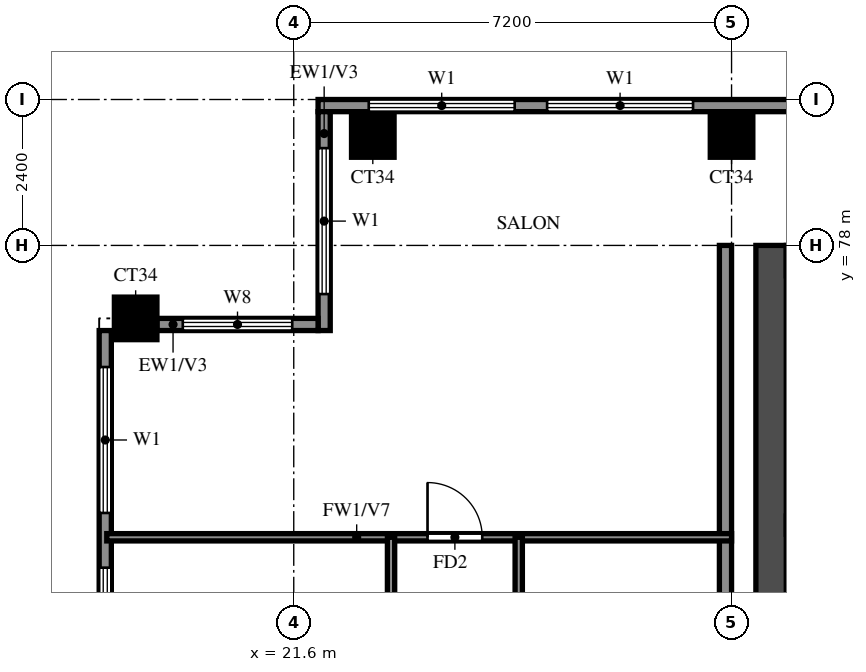
"""IFC4 building model, lengths in metres.
Left out: names, types, materials, properties, quantities, classifications, styles, units other than length and angle.
Written with IfcOpenShell. Run it as: python <this file> out.ifc"""

import sys

from ifc_helpers import new_model, si_unit, direction, frame, frame_2d, origin, origin_2d, place, context, subcontext, project, spatial, rectangle, extrude, source, transform, mapped, element, fill, save


model = new_model("IFC4")
c1 = context("Model", 3, precision=1e-05, world=origin(), true_north=direction((0.0, 1.0)))
c2 = subcontext(c1, "Body", "Model", "MODEL_VIEW")
j1 = project(units=[si_unit("LENGTHUNIT", "METRE"), si_unit("PLANEANGLEUNIT", "RADIAN")], contexts=[c1])
p1 = place(None, origin())
s1 = spatial("IfcSite", under=j1, at=p1, CompositionType="ELEMENT")
p2 = place(p1, origin())
s2 = spatial("IfcBuilding", under=s1, at=p2, CompositionType="ELEMENT")
p3 = place(p2, frame((0.0, 0.0, 225.5)))
s3 = spatial("IfcBuildingStorey", under=s2, at=p3, CompositionType="ELEMENT", Elevation=225.5)
m1 = source(origin(), c2, "Body", "SweptSolid", [
    extrude(rectangle(XDim=0.7, YDim=0.7, at=origin_2d()), origin(), (0.0, 0.0, 1.0), 3.22),
])
for number, where, z_axis, x_axis in (
    (1, (19.0, 76.8, 0.0), (0.0, 0.0, 1.0), (1.0, 0.0, 0.0)),
    (2, (22.9, 79.8, 0.0), (0.0, 0.0, 1.0), (1.0, 0.0, 0.0)),
    (3, (28.8, 79.8, 0.0), (0.0, 0.0, 1.0), (1.0, 0.0, 0.0)),
):
    element("IfcColumn", number, at=place(p3, frame(where, z_axis=z_axis, x_axis=x_axis)), inside=s3, PredefinedType="COLUMN", context=c2, shape_type="MappedRepresentation", body=[
        mapped(m1, transform((0.0, 0.0, 0.0))),
    ])
p4 = place(p3, frame((29.45, 66.15, 0.0), z_axis=(0.0, 0.0, 1.0), x_axis=(0.0, 1.0, 0.0)))
e4 = element("IfcWall", 4, at=p4, inside=s3, PredefinedType="SHEAR", context=c2, shape_type="SweptSolid", body=[
    extrude(rectangle(XDim=11.85, YDim=0.5, at=frame_2d((5.925, 0.0))), origin(), (0.0, 0.0, 1.0), 3.22),
])
p5 = place(p3, frame((78.6, 80.3, 0.0), z_axis=(0.0, 0.0, 1.0), x_axis=(-1.0, 0.0, 0.0)))
e5 = element("IfcWall", 5, at=p5, inside=s3, PredefinedType="SOLIDWALL", context=c2, shape_type="SweptSolid", body=[
    extrude(rectangle(XDim=56.6, YDim=0.2, at=frame_2d((28.3, 0.0))), origin(), (0.0, 0.0, 1.0), 3.22),
])
p6 = place(p5, frame((50.433, 0.0, 0.6)))
e6 = element("IfcOpeningElement", 6, at=p6, cuts=e5, PredefinedType="OPENING", context=c2, shape_type="SweptSolid", body=[
    extrude(rectangle(XDim=2.4, YDim=2.4, at=frame_2d((1.2, 1.2))), frame((0.0, 0.11, 0.0), z_axis=(0.0, -1.0, 0.0), x_axis=(1.0, 0.0, 0.0)), (0.0, 0.0, 1.0), 0.22),
])
p7 = place(p5, frame((53.367, 0.0, 0.6)))
e7 = element("IfcOpeningElement", 7, at=p7, cuts=e5, PredefinedType="OPENING", context=c2, shape_type="SweptSolid", body=[
    extrude(rectangle(XDim=2.4, YDim=2.4, at=frame_2d((1.2, 1.2))), frame((0.0, 0.11, 0.0), z_axis=(0.0, -1.0, 0.0), x_axis=(1.0, 0.0, 0.0)), (0.0, 0.0, 1.0), 0.22),
])
p8 = place(p5, frame((0.767, 0.0, 0.6)))
e8 = element("IfcOpeningElement", 8, at=p8, cuts=e5, PredefinedType="OPENING", context=c2, shape_type="SweptSolid", body=[
    extrude(rectangle(XDim=2.4, YDim=2.4, at=frame_2d((1.2, 1.2))), frame((0.0, 0.11, 0.0), z_axis=(0.0, -1.0, 0.0), x_axis=(1.0, 0.0, 0.0)), (0.0, 0.0, 1.0), 0.22),
])
p9 = place(p5, frame((3.633, 0.0, 0.6)))
e9 = element("IfcOpeningElement", 9, at=p9, cuts=e5, PredefinedType="OPENING", context=c2, shape_type="SweptSolid", body=[
    extrude(rectangle(XDim=2.4, YDim=2.4, at=frame_2d((1.2, 1.2))), frame((0.0, 0.11, 0.0), z_axis=(0.0, -1.0, 0.0), x_axis=(1.0, 0.0, 0.0)), (0.0, 0.0, 1.0), 0.22),
])
p10 = place(p3, frame((22.1, 80.2, 0.0), z_axis=(0.0, 0.0, 1.0), x_axis=(0.0, -1.0, 0.0)))
e10 = element("IfcWall", 10, at=p10, inside=s3, PredefinedType="SOLIDWALL", context=c2, shape_type="SweptSolid", body=[
    extrude(rectangle(XDim=3.6, YDim=0.2, at=frame_2d((1.8, 0.0))), origin(), (0.0, 0.0, 1.0), 3.22),
])
p11 = place(p10, frame((0.6, 0.0, 0.6)))
e11 = element("IfcOpeningElement", 11, at=p11, cuts=e10, PredefinedType="OPENING", context=c2, shape_type="SweptSolid", body=[
    extrude(rectangle(XDim=2.4, YDim=2.4, at=frame_2d((1.2, 1.2))), frame((0.0, 0.11, 0.0), z_axis=(0.0, -1.0, 0.0), x_axis=(1.0, 0.0, 0.0)), (0.0, 0.0, 1.0), 0.22),
])
p12 = place(p3, frame((22.0, 76.7, 0.0), z_axis=(0.0, 0.0, 1.0), x_axis=(-1.0, 0.0, 0.0)))
e12 = element("IfcWall", 12, at=p12, inside=s3, PredefinedType="SOLIDWALL", context=c2, shape_type="SweptSolid", body=[
    extrude(rectangle(XDim=2.65, YDim=0.2, at=frame_2d((1.325, 0.0))), origin(), (0.0, 0.0, 1.0), 3.22),
])
p13 = place(p12, frame((0.425, 0.0, 0.6)))
e13 = element("IfcOpeningElement", 13, at=p13, cuts=e12, PredefinedType="OPENING", context=c2, shape_type="SweptSolid", body=[
    extrude(rectangle(XDim=1.8, YDim=2.4, at=frame_2d((0.9, 1.2))), frame((0.0, 0.11, 0.0), z_axis=(0.0, -1.0, 0.0), x_axis=(1.0, 0.0, 0.0)), (0.0, 0.0, 1.0), 0.22),
])
p14 = place(p3, frame((18.5, 76.6, 0.0), z_axis=(0.0, 0.0, 1.0), x_axis=(0.0, -1.0, 0.0)))
e14 = element("IfcWall", 14, at=p14, inside=s3, PredefinedType="SOLIDWALL", context=c2, shape_type="SweptSolid", body=[
    extrude(rectangle(XDim=7.0, YDim=0.2, at=frame_2d((3.5, 0.0))), origin(), (0.0, 0.0, 1.0), 3.22),
])
p15 = place(p14, frame((3.9, 0.0, 0.6)))
e15 = element("IfcOpeningElement", 15, at=p15, cuts=e14, PredefinedType="OPENING", context=c2, shape_type="SweptSolid", body=[
    extrude(rectangle(XDim=2.4, YDim=2.4, at=frame_2d((1.2, 1.2))), frame((0.0, 0.11, 0.0), z_axis=(0.0, -1.0, 0.0), x_axis=(1.0, 0.0, 0.0)), (0.0, 0.0, 1.0), 0.22),
])
p16 = place(p14, frame((0.6, 0.0, 0.6)))
e16 = element("IfcOpeningElement", 16, at=p16, cuts=e14, PredefinedType="OPENING", context=c2, shape_type="SweptSolid", body=[
    extrude(rectangle(XDim=2.4, YDim=2.4, at=frame_2d((1.2, 1.2))), frame((0.0, 0.11, 0.0), z_axis=(0.0, -1.0, 0.0), x_axis=(1.0, 0.0, 0.0)), (0.0, 0.0, 1.0), 0.22),
])
p17 = place(p3, frame((28.7, 62.4, 0.0), z_axis=(0.0, 0.0, 1.0), x_axis=(0.0, 1.0, 0.0)))
e17 = element("IfcWall", 17, at=p17, inside=s3, PredefinedType="SOLIDWALL", context=c2, shape_type="SweptSolid", body=[
    extrude(rectangle(XDim=15.6, YDim=0.2, at=frame_2d((7.8, 0.0))), origin(), (0.0, 0.0, 1.0), 3.22),
])
p18 = place(p3, frame((18.525, 73.2, 0.0), z_axis=(0.0, 0.0, 1.0), x_axis=(1.0, 0.0, 0.0)))
e18 = element("IfcWall", 18, at=p18, inside=s3, PredefinedType="PARTITIONING", context=c2, shape_type="SweptSolid", body=[
    extrude(rectangle(XDim=10.275, YDim=0.12, at=frame_2d((5.138, 0.0))), origin(), (0.0, 0.0, 1.0), 2.32),
])
p19 = place(p18, frame((5.275, 0.0, 0.0)))
e19 = element("IfcOpeningElement", 19, at=p19, cuts=e18, PredefinedType="OPENING", context=c2, shape_type="SweptSolid", body=[
    extrude(rectangle(XDim=0.9, YDim=2.1, at=frame_2d((0.45, 1.05))), frame((0.0, 0.07, 0.0), z_axis=(0.0, -1.0, 0.0), x_axis=(1.0, 0.0, 0.0)), (0.0, 0.0, 1.0), 0.14),
])
p20 = place(p3, frame((23.2, 48.0, 0.0), z_axis=(0.0, 0.0, 1.0), x_axis=(0.0, 1.0, 0.0)))
e20 = element("IfcWall", 20, at=p20, inside=s3, PredefinedType="PARTITIONING", context=c2, shape_type="SweptSolid", body=[
    extrude(rectangle(XDim=25.2, YDim=0.12, at=frame_2d((12.6, 0.0))), origin(), (0.0, 0.0, 1.0), 3.22),
])
p21 = place(p20, frame((1.35, 0.0, 0.0)))
e21 = element("IfcOpeningElement", 21, at=p21, cuts=e20, PredefinedType="OPENING", context=c2, shape_type="SweptSolid", body=[
    extrude(rectangle(XDim=0.9, YDim=2.1, at=frame_2d((0.45, 1.05))), frame((0.0, 0.07, 0.0), z_axis=(0.0, -1.0, 0.0), x_axis=(1.0, 0.0, 0.0)), (0.0, 0.0, 1.0), 0.14),
])
p22 = place(p20, frame((4.95, 0.0, 0.0)))
e22 = element("IfcOpeningElement", 22, at=p22, cuts=e20, PredefinedType="OPENING", context=c2, shape_type="SweptSolid", body=[
    extrude(rectangle(XDim=0.9, YDim=2.1, at=frame_2d((0.45, 1.05))), frame((0.0, 0.07, 0.0), z_axis=(0.0, -1.0, 0.0), x_axis=(1.0, 0.0, 0.0)), (0.0, 0.0, 1.0), 0.14),
])
p23 = place(p20, frame((10.05, 0.0, 0.0)))
e23 = element("IfcOpeningElement", 23, at=p23, cuts=e20, PredefinedType="OPENING", context=c2, shape_type="SweptSolid", body=[
    extrude(rectangle(XDim=1.5, YDim=2.1, at=frame_2d((0.75, 1.05))), frame((0.0, 0.07, 0.0), z_axis=(0.0, -1.0, 0.0), x_axis=(1.0, 0.0, 0.0)), (0.0, 0.0, 1.0), 0.14),
])
p24 = place(p20, frame((15.75, 0.0, 0.0)))
e24 = element("IfcOpeningElement", 24, at=p24, cuts=e20, PredefinedType="OPENING", context=c2, shape_type="SweptSolid", body=[
    extrude(rectangle(XDim=0.9, YDim=2.1, at=frame_2d((0.45, 1.05))), frame((0.0, 0.07, 0.0), z_axis=(0.0, -1.0, 0.0), x_axis=(1.0, 0.0, 0.0)), (0.0, 0.0, 1.0), 0.14),
])
p25 = place(p20, frame((19.35, 0.0, 0.0)))
e25 = element("IfcOpeningElement", 25, at=p25, cuts=e20, PredefinedType="OPENING", context=c2, shape_type="SweptSolid", body=[
    extrude(rectangle(XDim=0.9, YDim=2.1, at=frame_2d((0.45, 1.05))), frame((0.0, 0.07, 0.0), z_axis=(0.0, -1.0, 0.0), x_axis=(1.0, 0.0, 0.0)), (0.0, 0.0, 1.0), 0.14),
])
p26 = place(p20, frame((22.95, 0.0, 0.0)))
e26 = element("IfcOpeningElement", 26, at=p26, cuts=e20, PredefinedType="OPENING", context=c2, shape_type="SweptSolid", body=[
    extrude(rectangle(XDim=0.9, YDim=2.1, at=frame_2d((0.45, 1.05))), frame((0.0, 0.07, 0.0), z_axis=(0.0, -1.0, 0.0), x_axis=(1.0, 0.0, 0.0)), (0.0, 0.0, 1.0), 0.14),
])
p27 = place(p3, frame((25.3, 64.8, 0.0), z_axis=(0.0, 0.0, 1.0), x_axis=(0.0, 1.0, 0.0)))
e27 = element("IfcWall", 27, at=p27, inside=s3, PredefinedType="PARTITIONING", context=c2, shape_type="SweptSolid", body=[
    extrude(rectangle(XDim=8.4, YDim=0.12, at=frame_2d((4.2, 0.0))), origin(), (0.0, 0.0, 1.0), 3.22),
])
p28 = place(p27, frame((4.975, 0.0, 0.0)))
e28 = element("IfcOpeningElement", 28, at=p28, cuts=e27, PredefinedType="OPENING", context=c2, shape_type="SweptSolid", body=[
    extrude(rectangle(XDim=0.9, YDim=2.1, at=frame_2d((0.45, 1.05))), frame((0.0, 0.07, 0.0), z_axis=(0.0, -1.0, 0.0), x_axis=(1.0, 0.0, 0.0)), (0.0, 0.0, 1.0), 0.14),
])
p29 = place(p6, origin())
e29 = element("IfcWindow", 29, at=p29, inside=s3, PartitioningType="DOUBLE_PANEL_VERTICAL", PredefinedType="WINDOW", context=c2, shape_type="SweptSolid", body=[
    extrude(rectangle(XDim=2.4, YDim=2.4, at=frame_2d((1.2, 1.2))), frame((0.0, 0.03, 0.0), z_axis=(0.0, -1.0, 0.0), x_axis=(1.0, 0.0, 0.0)), (0.0, 0.0, 1.0), 0.06),
])
fill(e6, e29)
p30 = place(p7, origin())
e30 = element("IfcWindow", 30, at=p30, inside=s3, PartitioningType="DOUBLE_PANEL_VERTICAL", PredefinedType="WINDOW", context=c2, shape_type="SweptSolid", body=[
    extrude(rectangle(XDim=2.4, YDim=2.4, at=frame_2d((1.2, 1.2))), frame((0.0, 0.03, 0.0), z_axis=(0.0, -1.0, 0.0), x_axis=(1.0, 0.0, 0.0)), (0.0, 0.0, 1.0), 0.06),
])
fill(e7, e30)
p31 = place(p11, origin())
e31 = element("IfcWindow", 31, at=p31, inside=s3, PartitioningType="DOUBLE_PANEL_VERTICAL", PredefinedType="WINDOW", context=c2, shape_type="SweptSolid", body=[
    extrude(rectangle(XDim=2.4, YDim=2.4, at=frame_2d((1.2, 1.2))), frame((0.0, 0.03, 0.0), z_axis=(0.0, -1.0, 0.0), x_axis=(1.0, 0.0, 0.0)), (0.0, 0.0, 1.0), 0.06),
])
fill(e11, e31)
p32 = place(p13, origin())
e32 = element("IfcWindow", 32, at=p32, inside=s3, PartitioningType="DOUBLE_PANEL_VERTICAL", PredefinedType="WINDOW", context=c2, shape_type="SweptSolid", body=[
    extrude(rectangle(XDim=1.8, YDim=2.4, at=frame_2d((0.9, 1.2))), frame((0.0, 0.03, 0.0), z_axis=(0.0, -1.0, 0.0), x_axis=(1.0, 0.0, 0.0)), (0.0, 0.0, 1.0), 0.06),
])
fill(e13, e32)
p33 = place(p15, origin())
e33 = element("IfcWindow", 33, at=p33, inside=s3, PartitioningType="DOUBLE_PANEL_VERTICAL", PredefinedType="WINDOW", context=c2, shape_type="SweptSolid", body=[
    extrude(rectangle(XDim=2.4, YDim=2.4, at=frame_2d((1.2, 1.2))), frame((0.0, 0.03, 0.0), z_axis=(0.0, -1.0, 0.0), x_axis=(1.0, 0.0, 0.0)), (0.0, 0.0, 1.0), 0.06),
])
fill(e15, e33)
p34 = place(p16, origin())
e34 = element("IfcWindow", 34, at=p34, inside=s3, PartitioningType="DOUBLE_PANEL_VERTICAL", PredefinedType="WINDOW", context=c2, shape_type="SweptSolid", body=[
    extrude(rectangle(XDim=2.4, YDim=2.4, at=frame_2d((1.2, 1.2))), frame((0.0, 0.03, 0.0), z_axis=(0.0, -1.0, 0.0), x_axis=(1.0, 0.0, 0.0)), (0.0, 0.0, 1.0), 0.06),
])
fill(e16, e34)
p35 = place(p19, origin())
e35 = element("IfcDoor", 35, at=p35, inside=s3, OperationType="SINGLE_SWING_LEFT", PredefinedType="DOOR", context=c2, shape_type="SweptSolid", body=[
    extrude(rectangle(XDim=0.9, YDim=2.1, at=frame_2d((0.45, 1.05))), frame((0.0, 0.025, 0.0), z_axis=(0.0, -1.0, 0.0), x_axis=(1.0, 0.0, 0.0)), (0.0, 0.0, 1.0), 0.05),
])
fill(e19, e35)
save(model, sys.argv[1])
